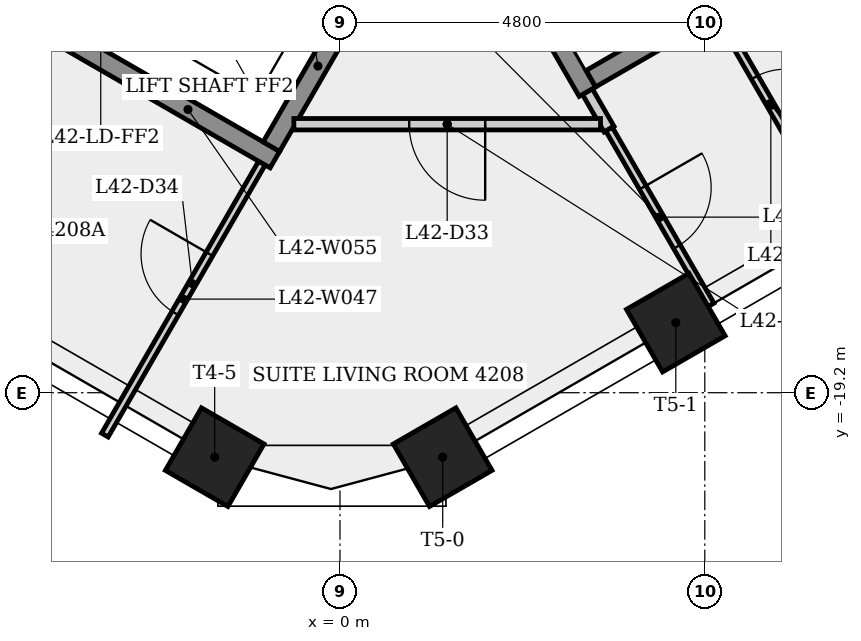
"""IFC4 building model, lengths in metres.
Left out: names, types, materials, properties, quantities, classifications, styles, units other than length and angle.
Written with IfcOpenShell. Run it as: python <this file> out.ifc"""

import sys

from ifc_helpers import new_model, si_unit, direction, frame, frame_2d, origin, origin_2d, place, context, subcontext, project, spatial, rectangle, extrude, element, fill, save


model = new_model("IFC4")
c1 = context("Model", 3, precision=1e-05, world=origin(), true_north=direction((0.0, 1.0)))
c2 = subcontext(c1, "Body", "Model", "MODEL_VIEW")
j1 = project(units=[si_unit("LENGTHUNIT", "METRE"), si_unit("PLANEANGLEUNIT", "RADIAN")], contexts=[c1])
p1 = place(None, origin())
s1 = spatial("IfcSite", under=j1, at=p1, CompositionType="ELEMENT")
p2 = place(p1, origin())
s2 = spatial("IfcBuilding", under=s1, at=p2, CompositionType="ELEMENT")
p3 = place(p2, frame((0.0, 0.0, 159.5)))
s3 = spatial("IfcBuildingStorey", under=s2, at=p3, CompositionType="ELEMENT", Elevation=159.5)
for number, where, z_axis, x_axis in (
    (1, (-1.648, -20.048, 0.0), (0.0, 0.0, 1.0), (-0.5, -0.866, 0.0)),
    (2, (1.352, -20.048, 0.0), (0.0, 0.0, 1.0), (0.5, -0.866, 0.0)),
    (3, (4.419, -18.278, 0.0), (0.0, 0.0, 1.0), (0.5, -0.866, 0.0)),
):
    element("IfcColumn", number, at=place(p3, frame(where, z_axis=z_axis, x_axis=x_axis)), inside=s3, PredefinedType="COLUMN", context=c2, shape_type="SweptSolid", body=[
        extrude(rectangle(XDim=0.95, YDim=0.95, at=origin_2d()), origin(), (0.0, 0.0, 1.0), 3.4),
    ])
p4 = place(p3, frame((-3.094, -19.758, 0.0), z_axis=(0.0, 0.0, 1.0), x_axis=(0.500027577057, 0.866009481578, 0.0)))
e4 = element("IfcWall", 4, at=p4, inside=s3, PredefinedType="PARTITIONING", context=c2, shape_type="SweptSolid", body=[
    extrude(rectangle(XDim=4.133, YDim=0.1, at=frame_2d((2.066, 0.0))), origin(), (0.0, 0.0, 1.0), 3.05),
])
p5 = place(p4, frame((1.852, 0.0, 0.0)))
e5 = element("IfcOpeningElement", 5, at=p5, cuts=e4, PredefinedType="OPENING", context=c2, shape_type="SweptSolid", body=[
    extrude(rectangle(XDim=0.9, YDim=2.1, at=frame_2d((0.45, 1.05))), frame((0.0, 0.06, 0.0), z_axis=(0.0, -1.0, 0.0), x_axis=(1.0, 0.0, 0.0)), (0.0, 0.0, 1.0), 0.12),
])
p6 = place(p3, frame((-0.856, -16.133, 0.0), z_axis=(0.0, 0.0, 1.0), x_axis=(-0.866021716278, 0.500006386895, 0.0)))
e6 = element("IfcWall", 6, at=p6, inside=s3, PredefinedType="SHEAR", context=c2, shape_type="SweptSolid", body=[
    extrude(rectangle(XDim=3.3, YDim=0.25, at=frame_2d((1.65, 0.0))), origin(), (0.0, 0.0, 1.0), 3.05),
])
p7 = place(p3, frame((-0.902, -15.962, 0.0), z_axis=(0.0, 0.0, 1.0), x_axis=(0.500061746146, 0.865989751695, 0.0)))
e7 = element("IfcWall", 7, at=p7, inside=s3, PredefinedType="SHEAR", context=c2, shape_type="SweptSolid", body=[
    extrude(rectangle(XDim=2.45, YDim=0.25, at=frame_2d((1.225, 0.0))), origin(), (0.0, 0.0, 1.0), 3.4),
])
p8 = place(p3, frame((3.256, -15.239, 0.0), z_axis=(0.0, 0.0, 1.0), x_axis=(0.49987077196, -0.866100000774, 0.0)))
e8 = element("IfcWall", 8, at=p8, inside=s3, PredefinedType="PARTITIONING", context=c2, shape_type="SweptSolid", body=[
    extrude(rectangle(XDim=0.57, YDim=0.15, at=frame_2d((0.285, 0.0))), origin(), (0.0, 0.0, 1.0), 3.05),
])
p9 = place(p3, frame((3.256, -15.239, 0.0), z_axis=(0.0, 0.0, 1.0), x_axis=(-0.50002537861, 0.866010750942, 0.0)))
e9 = element("IfcWall", 9, at=p9, inside=s3, PredefinedType="SHEAR", context=c2, shape_type="SweptSolid", body=[
    extrude(rectangle(XDim=3.0, YDim=0.25, at=frame_2d((1.5, 0.0))), origin(), (0.0, 0.0, 1.0), 3.05),
])
p10 = place(p3, frame((3.428, -15.667, 0.0), z_axis=(0.0, 0.0, 1.0), x_axis=(-1.0, 0.0, 0.0)))
e10 = element("IfcWall", 10, at=p10, inside=s3, PredefinedType="PARTITIONING", context=c2, shape_type="SweptSolid", body=[
    extrude(rectangle(XDim=4.035, YDim=0.15, at=frame_2d((2.017, 0.0))), origin(), (0.0, 0.0, 1.0), 3.05),
])
p11 = place(p10, frame((1.517, 0.0, 0.0)))
e11 = element("IfcOpeningElement", 11, at=p11, cuts=e10, PredefinedType="OPENING", context=c2, shape_type="SweptSolid", body=[
    extrude(rectangle(XDim=1.0, YDim=2.1, at=frame_2d((0.5, 1.05))), frame((0.0, 0.085, 0.0), z_axis=(0.0, -1.0, 0.0), x_axis=(1.0, 0.0, 0.0)), (0.0, 0.0, 1.0), 0.17),
])
p12 = place(p3, frame((3.541, -15.732, 0.0), z_axis=(0.0, 0.0, 1.0), x_axis=(0.500009734663, -0.866019783401, 0.0)))
e12 = element("IfcWall", 12, at=p12, inside=s3, PredefinedType="PARTITIONING", context=c2, shape_type="SweptSolid", body=[
    extrude(rectangle(XDim=2.673, YDim=0.1, at=frame_2d((1.336, 0.0))), origin(), (0.0, 0.0, 1.0), 3.05),
])
p13 = place(p12, frame((0.886, 0.0, 0.0)))
e13 = element("IfcOpeningElement", 13, at=p13, cuts=e12, PredefinedType="OPENING", context=c2, shape_type="SweptSolid", body=[
    extrude(rectangle(XDim=0.9, YDim=2.1, at=frame_2d((0.45, 1.05))), frame((0.0, 0.06, 0.0), z_axis=(0.0, -1.0, 0.0), x_axis=(1.0, 0.0, 0.0)), (0.0, 0.0, 1.0), 0.12),
])
p14 = place(p3, frame((4.988, -14.239, 0.0), z_axis=(0.0, 0.0, 1.0), x_axis=(0.500022328685, -0.866012511928, 0.0)))
e14 = element("IfcWall", 14, at=p14, inside=s3, PredefinedType="PARTITIONING", context=c2, shape_type="SweptSolid", body=[
    extrude(rectangle(XDim=2.725, YDim=0.1, at=frame_2d((1.363, 0.0))), origin(), (0.0, 0.0, 1.0), 3.05),
])
p15 = place(p14, frame((0.938, 0.0, 0.0)))
e15 = element("IfcOpeningElement", 15, at=p15, cuts=e14, PredefinedType="OPENING", context=c2, shape_type="SweptSolid", body=[
    extrude(rectangle(XDim=0.8, YDim=2.1, at=frame_2d((0.4, 1.05))), frame((0.0, 0.06, 0.0), z_axis=(0.0, -1.0, 0.0), x_axis=(1.0, 0.0, 0.0)), (0.0, 0.0, 1.0), 0.12),
])
p16 = place(p3, frame((3.301, -15.068, 0.0), z_axis=(0.0, 0.0, 1.0), x_axis=(0.866035036182, 0.499983315828, 0.0)))
e16 = element("IfcWall", 16, at=p16, inside=s3, PredefinedType="SHEAR", context=c2, shape_type="SweptSolid", body=[
    extrude(rectangle(XDim=6.4, YDim=0.25, at=frame_2d((3.2, 0.0))), origin(), (0.0, 0.0, 1.0), 3.05),
])
p17 = place(p11, origin())
e17 = element("IfcDoor", 17, at=p17, inside=s3, OperationType="SINGLE_SWING_LEFT", PredefinedType="DOOR", context=c2, shape_type="SweptSolid", body=[
    extrude(rectangle(XDim=1.0, YDim=2.1, at=frame_2d((0.5, 1.05))), frame((0.0, 0.025, 0.0), z_axis=(0.0, -1.0, 0.0), x_axis=(1.0, 0.0, 0.0)), (0.0, 0.0, 1.0), 0.05),
])
fill(e11, e17)
p18 = place(p5, origin())
e18 = element("IfcDoor", 18, at=p18, inside=s3, OperationType="SINGLE_SWING_RIGHT", PredefinedType="DOOR", context=c2, shape_type="SweptSolid", body=[
    extrude(rectangle(XDim=0.9, YDim=2.1, at=frame_2d((0.45, 1.05))), frame((0.0, 0.025, 0.0), z_axis=(0.0, -1.0, 0.0), x_axis=(1.0, 0.0, 0.0)), (0.0, 0.0, 1.0), 0.05),
])
fill(e5, e18)
p19 = place(p13, origin())
e19 = element("IfcDoor", 19, at=p19, inside=s3, OperationType="SINGLE_SWING_LEFT", PredefinedType="DOOR", context=c2, shape_type="SweptSolid", body=[
    extrude(rectangle(XDim=0.9, YDim=2.1, at=frame_2d((0.45, 1.05))), frame((0.0, 0.025, 0.0), z_axis=(0.0, -1.0, 0.0), x_axis=(1.0, 0.0, 0.0)), (0.0, 0.0, 1.0), 0.05),
])
fill(e13, e19)
p20 = place(p15, origin())
e20 = element("IfcDoor", 20, at=p20, inside=s3, OperationType="SINGLE_SWING_RIGHT", PredefinedType="DOOR", context=c2, shape_type="SweptSolid", body=[
    extrude(rectangle(XDim=0.8, YDim=2.1, at=frame_2d((0.4, 1.05))), frame((0.0, 0.025, 0.0), z_axis=(0.0, -1.0, 0.0), x_axis=(1.0, 0.0, 0.0)), (0.0, 0.0, 1.0), 0.05),
])
fill(e15, e20)
save(model, sys.argv[1])
